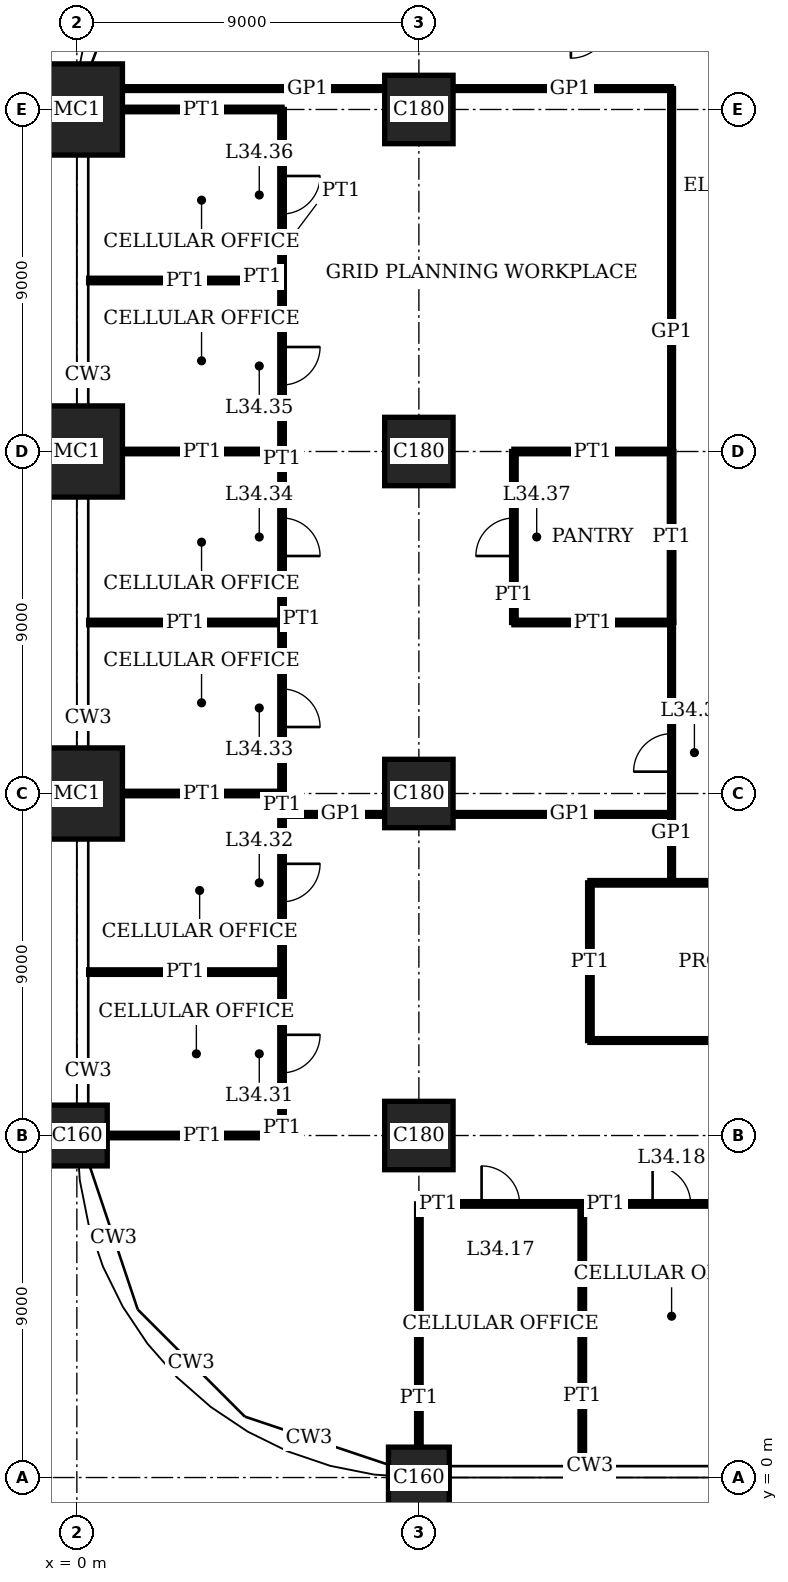
"""IFC4 building model, lengths in metres.
Left out: names, types, materials, properties, quantities, classifications, styles, units other than length and angle.
Written with IfcOpenShell. Run it as: python <this file> out.ifc"""

import sys

from ifc_helpers import new_model, si_unit, direction, frame, frame_2d, origin, origin_2d, place, context, subcontext, project, spatial, rectangle, extrude, element, fill, save


model = new_model("IFC4")
c1 = context("Model", 3, precision=1e-05, world=origin(), true_north=direction((0.0, 1.0)))
c2 = subcontext(c1, "Body", "Model", "MODEL_VIEW")
j1 = project(units=[si_unit("LENGTHUNIT", "METRE"), si_unit("PLANEANGLEUNIT", "RADIAN")], contexts=[c1])
p1 = place(None, origin())
s1 = spatial("IfcSite", under=j1, at=p1, CompositionType="ELEMENT")
p2 = place(p1, origin())
s2 = spatial("IfcBuilding", under=s1, at=p2, CompositionType="ELEMENT")
p3 = place(p2, frame((0.0, 0.0, 141.0)))
s3 = spatial("IfcBuildingStorey", under=s2, at=p3, CompositionType="ELEMENT", Elevation=141.0)
p4 = place(p3, frame((0.0, 9.0, 0.0), z_axis=(0.0, 0.0, 1.0), x_axis=(1.0, 0.0, 0.0)))
e1 = element("IfcColumn", 1, at=p4, inside=s3, PredefinedType="COLUMN", context=c2, shape_type="SweptSolid", body=[
    extrude(rectangle(XDim=1.6, YDim=1.6, at=origin_2d()), origin(), (0.0, 0.0, 1.0), 4.0),
])
for number, where, z_axis, x_axis in (
    (2, (0.0, 18.0, 0.0), (0.0, 0.0, 1.0), (1.0, 0.0, 0.0)),
    (3, (0.0, 27.0, 0.0), (0.0, 0.0, 1.0), (1.0, 0.0, 0.0)),
    (4, (0.0, 36.0, 0.0), (0.0, 0.0, 1.0), (1.0, 0.0, 0.0)),
):
    element("IfcColumn", number, at=place(p3, frame(where, z_axis=z_axis, x_axis=x_axis)), inside=s3, PredefinedType="COLUMN", context=c2, shape_type="SweptSolid", body=[
        extrude(rectangle(XDim=2.4, YDim=2.4, at=origin_2d()), origin(), (0.0, 0.0, 1.0), 4.0),
    ])
p5 = place(p3, frame((9.0, 0.0, 0.0), z_axis=(0.0, 0.0, 1.0), x_axis=(1.0, 0.0, 0.0)))
e5 = element("IfcColumn", 5, at=p5, inside=s3, PredefinedType="COLUMN", context=c2, shape_type="SweptSolid", body=[
    extrude(rectangle(XDim=1.6, YDim=1.6, at=origin_2d()), origin(), (0.0, 0.0, 1.0), 4.0),
])
for number, where, z_axis, x_axis in (
    (6, (9.0, 9.0, 0.0), (0.0, 0.0, 1.0), (1.0, 0.0, 0.0)),
    (7, (9.0, 18.0, 0.0), (0.0, 0.0, 1.0), (1.0, 0.0, 0.0)),
    (8, (9.0, 27.0, 0.0), (0.0, 0.0, 1.0), (1.0, 0.0, 0.0)),
    (9, (9.0, 36.0, 0.0), (0.0, 0.0, 1.0), (1.0, 0.0, 0.0)),
):
    element("IfcColumn", number, at=place(p3, frame(where, z_axis=z_axis, x_axis=x_axis)), inside=s3, PredefinedType="COLUMN", context=c2, shape_type="SweptSolid", body=[
        extrude(rectangle(XDim=1.8, YDim=1.8, at=origin_2d()), origin(), (0.0, 0.0, 1.0), 4.0),
    ])
p6 = place(p3, frame((9.0, 7.2, 0.0), z_axis=(0.0, 0.0, 1.0), x_axis=(1.0, 0.0, 0.0)))
e10 = element("IfcWall", 10, at=p6, inside=s3, PredefinedType="PARTITIONING", context=c2, shape_type="SweptSolid", body=[
    extrude(rectangle(XDim=4.3, YDim=0.12, at=frame_2d((2.15, 0.0))), origin(), (0.0, 0.0, 1.0), 3.75),
])
p7 = place(p6, frame((1.65, 0.0, 0.0)))
e11 = element("IfcOpeningElement", 11, at=p7, cuts=e10, PredefinedType="OPENING", context=c2, shape_type="SweptSolid", body=[
    extrude(rectangle(XDim=1.0, YDim=2.4, at=frame_2d((0.5, 1.2))), frame((0.0, 0.07, 0.0), z_axis=(0.0, -1.0, 0.0), x_axis=(1.0, 0.0, 0.0)), (0.0, 0.0, 1.0), 0.14),
])
p8 = place(p3, frame((13.3, 7.2, 0.0), z_axis=(0.0, 0.0, 1.0), x_axis=(1.0, 0.0, 0.0)))
e12 = element("IfcWall", 12, at=p8, inside=s3, PredefinedType="PARTITIONING", context=c2, shape_type="SweptSolid", body=[
    extrude(rectangle(XDim=4.7, YDim=0.12, at=frame_2d((2.35, 0.0))), origin(), (0.0, 0.0, 1.0), 3.75),
])
p9 = place(p8, frame((1.85, 0.0, 0.0)))
e13 = element("IfcOpeningElement", 13, at=p9, cuts=e12, PredefinedType="OPENING", context=c2, shape_type="SweptSolid", body=[
    extrude(rectangle(XDim=1.0, YDim=2.4, at=frame_2d((0.5, 1.2))), frame((0.0, 0.07, 0.0), z_axis=(0.0, -1.0, 0.0), x_axis=(1.0, 0.0, 0.0)), (0.0, 0.0, 1.0), 0.14),
])
p10 = place(p3, frame((0.8, 9.0, 0.0), z_axis=(0.0, 0.0, 1.0), x_axis=(1.0, 0.0, 0.0)))
e14 = element("IfcWall", 14, at=p10, inside=s3, PredefinedType="PARTITIONING", context=c2, shape_type="SweptSolid", body=[
    extrude(rectangle(XDim=4.6, YDim=0.12, at=frame_2d((2.3, 0.0))), origin(), (0.0, 0.0, 1.0), 3.05),
])
p11 = place(p3, frame((13.5, 11.5, 0.0), z_axis=(0.0, 0.0, 1.0), x_axis=(1.0, 0.0, 0.0)))
e15 = element("IfcWall", 15, at=p11, inside=s3, PredefinedType="PARTITIONING", context=c2, shape_type="SweptSolid", body=[
    extrude(rectangle(XDim=9.0, YDim=0.1, at=frame_2d((4.5, 0.0))), origin(), (0.0, 0.0, 1.0), 3.75),
])
p12 = place(p11, frame((4.0, 0.0, 0.0)))
e16 = element("IfcOpeningElement", 16, at=p12, cuts=e15, PredefinedType="OPENING", context=c2, shape_type="SweptSolid", body=[
    extrude(rectangle(XDim=1.0, YDim=2.4, at=frame_2d((0.5, 1.2))), frame((0.0, 0.06, 0.0), z_axis=(0.0, -1.0, 0.0), x_axis=(1.0, 0.0, 0.0)), (0.0, 0.0, 1.0), 0.12),
])
p13 = place(p3, frame((0.31, 13.3, 0.0), z_axis=(0.0, 0.0, 1.0), x_axis=(1.0, 0.0, 0.0)))
e17 = element("IfcWall", 17, at=p13, inside=s3, PredefinedType="PARTITIONING", context=c2, shape_type="SweptSolid", body=[
    extrude(rectangle(XDim=5.09, YDim=0.12, at=frame_2d((2.545, 0.0))), origin(), (0.0, 0.0, 1.0), 3.1),
])
p14 = place(p3, frame((13.5, 15.65, 0.0), z_axis=(0.0, 0.0, 1.0), x_axis=(1.0, 0.0, 0.0)))
e18 = element("IfcWall", 18, at=p14, inside=s3, PredefinedType="PARTITIONING", context=c2, shape_type="SweptSolid", body=[
    extrude(rectangle(XDim=9.0, YDim=0.12, at=frame_2d((4.5, 0.0))), origin(), (0.0, 0.0, 1.0), 3.75),
])
p15 = place(p3, frame((5.39, 17.45, 0.0), z_axis=(0.0, 0.0, 1.0), x_axis=(1.0, 0.0, 0.0)))
e19 = element("IfcWall", 19, at=p15, inside=s3, PredefinedType="PARTITIONING", context=c2, shape_type="SweptSolid", body=[
    extrude(rectangle(XDim=2.71, YDim=0.1, at=frame_2d((1.355, 0.0))), origin(), (0.0, 0.0, 1.0), 3.05),
])
p16 = place(p3, frame((9.9, 17.45, 0.0), z_axis=(0.0, 0.0, 1.0), x_axis=(1.0, 0.0, 0.0)))
e20 = element("IfcWall", 20, at=p16, inside=s3, PredefinedType="PARTITIONING", context=c2, shape_type="SweptSolid", body=[
    extrude(rectangle(XDim=5.75, YDim=0.1, at=frame_2d((2.875, 0.0))), origin(), (0.0, 0.0, 1.0), 3.05),
])
p17 = place(p3, frame((1.2, 18.0, 0.0), z_axis=(0.0, 0.0, 1.0), x_axis=(1.0, 0.0, 0.0)))
e21 = element("IfcWall", 21, at=p17, inside=s3, PredefinedType="PARTITIONING", context=c2, shape_type="SweptSolid", body=[
    extrude(rectangle(XDim=4.2, YDim=0.12, at=frame_2d((2.1, 0.0))), origin(), (0.0, 0.0, 1.0), 3.05),
])
p18 = place(p3, frame((0.31, 22.5, 0.0), z_axis=(0.0, 0.0, 1.0), x_axis=(1.0, 0.0, 0.0)))
e22 = element("IfcWall", 22, at=p18, inside=s3, PredefinedType="PARTITIONING", context=c2, shape_type="SweptSolid", body=[
    extrude(rectangle(XDim=5.09, YDim=0.12, at=frame_2d((2.545, 0.0))), origin(), (0.0, 0.0, 1.0), 3.1),
])
p19 = place(p3, frame((11.5, 22.5, 0.0), z_axis=(0.0, 0.0, 1.0), x_axis=(1.0, 0.0, 0.0)))
e23 = element("IfcWall", 23, at=p19, inside=s3, PredefinedType="PARTITIONING", context=c2, shape_type="SweptSolid", body=[
    extrude(rectangle(XDim=4.15, YDim=0.12, at=frame_2d((2.075, 0.0))), origin(), (0.0, 0.0, 1.0), 3.1),
])
p20 = place(p3, frame((1.2, 27.0, 0.0), z_axis=(0.0, 0.0, 1.0), x_axis=(1.0, 0.0, 0.0)))
e24 = element("IfcWall", 24, at=p20, inside=s3, PredefinedType="PARTITIONING", context=c2, shape_type="SweptSolid", body=[
    extrude(rectangle(XDim=4.2, YDim=0.12, at=frame_2d((2.1, 0.0))), origin(), (0.0, 0.0, 1.0), 3.05),
])
p21 = place(p3, frame((11.5, 27.0, 0.0), z_axis=(0.0, 0.0, 1.0), x_axis=(1.0, 0.0, 0.0)))
e25 = element("IfcWall", 25, at=p21, inside=s3, PredefinedType="PARTITIONING", context=c2, shape_type="SweptSolid", body=[
    extrude(rectangle(XDim=4.15, YDim=0.12, at=frame_2d((2.075, 0.0))), origin(), (0.0, 0.0, 1.0), 3.05),
])
p22 = place(p3, frame((0.31, 31.5, 0.0), z_axis=(0.0, 0.0, 1.0), x_axis=(1.0, 0.0, 0.0)))
e26 = element("IfcWall", 26, at=p22, inside=s3, PredefinedType="PARTITIONING", context=c2, shape_type="SweptSolid", body=[
    extrude(rectangle(XDim=5.09, YDim=0.12, at=frame_2d((2.545, 0.0))), origin(), (0.0, 0.0, 1.0), 3.1),
])
p23 = place(p3, frame((1.2, 36.0, 0.0), z_axis=(0.0, 0.0, 1.0), x_axis=(1.0, 0.0, 0.0)))
e27 = element("IfcWall", 27, at=p23, inside=s3, PredefinedType="PARTITIONING", context=c2, shape_type="SweptSolid", body=[
    extrude(rectangle(XDim=4.2, YDim=0.12, at=frame_2d((2.1, 0.0))), origin(), (0.0, 0.0, 1.0), 3.05),
])
p24 = place(p3, frame((1.2, 36.55, 0.0), z_axis=(0.0, 0.0, 1.0), x_axis=(1.0, 0.0, 0.0)))
e28 = element("IfcWall", 28, at=p24, inside=s3, PredefinedType="PARTITIONING", context=c2, shape_type="SweptSolid", body=[
    extrude(rectangle(XDim=6.9, YDim=0.1, at=frame_2d((3.45, 0.0))), origin(), (0.0, 0.0, 1.0), 3.05),
])
p25 = place(p3, frame((9.9, 36.55, 0.0), z_axis=(0.0, 0.0, 1.0), x_axis=(1.0, 0.0, 0.0)))
e29 = element("IfcWall", 29, at=p25, inside=s3, PredefinedType="PARTITIONING", context=c2, shape_type="SweptSolid", body=[
    extrude(rectangle(XDim=5.75, YDim=0.1, at=frame_2d((2.875, 0.0))), origin(), (0.0, 0.0, 1.0), 3.05),
])
p26 = place(p3, frame((5.4, 9.0, 0.0), z_axis=(0.0, 0.0, 1.0), x_axis=(0.0, 1.0, 0.0)))
e30 = element("IfcWall", 30, at=p26, inside=s3, PredefinedType="PARTITIONING", context=c2, shape_type="SweptSolid", body=[
    extrude(rectangle(XDim=4.3, YDim=0.12, at=frame_2d((2.15, 0.0))), origin(), (0.0, 0.0, 1.0), 3.75),
])
p27 = place(p26, frame((1.65, 0.0, 0.0)))
e31 = element("IfcOpeningElement", 31, at=p27, cuts=e30, PredefinedType="OPENING", context=c2, shape_type="SweptSolid", body=[
    extrude(rectangle(XDim=1.0, YDim=2.4, at=frame_2d((0.5, 1.2))), frame((0.0, 0.07, 0.0), z_axis=(0.0, -1.0, 0.0), x_axis=(1.0, 0.0, 0.0)), (0.0, 0.0, 1.0), 0.14),
])
p28 = place(p3, frame((5.4, 13.3, 0.0), z_axis=(0.0, 0.0, 1.0), x_axis=(0.0, 1.0, 0.0)))
e32 = element("IfcWall", 32, at=p28, inside=s3, PredefinedType="PARTITIONING", context=c2, shape_type="SweptSolid", body=[
    extrude(rectangle(XDim=4.7, YDim=0.12, at=frame_2d((2.35, 0.0))), origin(), (0.0, 0.0, 1.0), 3.75),
])
p29 = place(p28, frame((1.85, 0.0, 0.0)))
e33 = element("IfcOpeningElement", 33, at=p29, cuts=e32, PredefinedType="OPENING", context=c2, shape_type="SweptSolid", body=[
    extrude(rectangle(XDim=1.0, YDim=2.4, at=frame_2d((0.5, 1.2))), frame((0.0, 0.07, 0.0), z_axis=(0.0, -1.0, 0.0), x_axis=(1.0, 0.0, 0.0)), (0.0, 0.0, 1.0), 0.14),
])
p30 = place(p3, frame((5.4, 18.0, 0.0), z_axis=(0.0, 0.0, 1.0), x_axis=(0.0, 1.0, 0.0)))
e34 = element("IfcWall", 34, at=p30, inside=s3, PredefinedType="PARTITIONING", context=c2, shape_type="SweptSolid", body=[
    extrude(rectangle(XDim=4.5, YDim=0.12, at=frame_2d((2.25, 0.0))), origin(), (0.0, 0.0, 1.0), 3.75),
])
p31 = place(p30, frame((1.75, 0.0, 0.0)))
e35 = element("IfcOpeningElement", 35, at=p31, cuts=e34, PredefinedType="OPENING", context=c2, shape_type="SweptSolid", body=[
    extrude(rectangle(XDim=1.0, YDim=2.4, at=frame_2d((0.5, 1.2))), frame((0.0, 0.07, 0.0), z_axis=(0.0, -1.0, 0.0), x_axis=(1.0, 0.0, 0.0)), (0.0, 0.0, 1.0), 0.14),
])
p32 = place(p3, frame((5.4, 22.5, 0.0), z_axis=(0.0, 0.0, 1.0), x_axis=(0.0, 1.0, 0.0)))
e36 = element("IfcWall", 36, at=p32, inside=s3, PredefinedType="PARTITIONING", context=c2, shape_type="SweptSolid", body=[
    extrude(rectangle(XDim=4.5, YDim=0.12, at=frame_2d((2.25, 0.0))), origin(), (0.0, 0.0, 1.0), 3.75),
])
p33 = place(p32, frame((1.75, 0.0, 0.0)))
e37 = element("IfcOpeningElement", 37, at=p33, cuts=e36, PredefinedType="OPENING", context=c2, shape_type="SweptSolid", body=[
    extrude(rectangle(XDim=1.0, YDim=2.4, at=frame_2d((0.5, 1.2))), frame((0.0, 0.07, 0.0), z_axis=(0.0, -1.0, 0.0), x_axis=(1.0, 0.0, 0.0)), (0.0, 0.0, 1.0), 0.14),
])
p34 = place(p3, frame((5.4, 27.0, 0.0), z_axis=(0.0, 0.0, 1.0), x_axis=(0.0, 1.0, 0.0)))
e38 = element("IfcWall", 38, at=p34, inside=s3, PredefinedType="PARTITIONING", context=c2, shape_type="SweptSolid", body=[
    extrude(rectangle(XDim=4.5, YDim=0.12, at=frame_2d((2.25, 0.0))), origin(), (0.0, 0.0, 1.0), 3.75),
])
p35 = place(p34, frame((1.75, 0.0, 0.0)))
e39 = element("IfcOpeningElement", 39, at=p35, cuts=e38, PredefinedType="OPENING", context=c2, shape_type="SweptSolid", body=[
    extrude(rectangle(XDim=1.0, YDim=2.4, at=frame_2d((0.5, 1.2))), frame((0.0, 0.07, 0.0), z_axis=(0.0, -1.0, 0.0), x_axis=(1.0, 0.0, 0.0)), (0.0, 0.0, 1.0), 0.14),
])
p36 = place(p3, frame((5.4, 31.5, 0.0), z_axis=(0.0, 0.0, 1.0), x_axis=(0.0, 1.0, 0.0)))
e40 = element("IfcWall", 40, at=p36, inside=s3, PredefinedType="PARTITIONING", context=c2, shape_type="SweptSolid", body=[
    extrude(rectangle(XDim=4.5, YDim=0.12, at=frame_2d((2.25, 0.0))), origin(), (0.0, 0.0, 1.0), 3.75),
])
p37 = place(p36, frame((1.75, 0.0, 0.0)))
e41 = element("IfcOpeningElement", 41, at=p37, cuts=e40, PredefinedType="OPENING", context=c2, shape_type="SweptSolid", body=[
    extrude(rectangle(XDim=1.0, YDim=2.4, at=frame_2d((0.5, 1.2))), frame((0.0, 0.07, 0.0), z_axis=(0.0, -1.0, 0.0), x_axis=(1.0, 0.0, 0.0)), (0.0, 0.0, 1.0), 0.14),
])
p38 = place(p3, frame((9.0, 0.8, 0.0), z_axis=(0.0, 0.0, 1.0), x_axis=(0.0, 1.0, 0.0)))
e42 = element("IfcWall", 42, at=p38, inside=s3, PredefinedType="PARTITIONING", context=c2, shape_type="SweptSolid", body=[
    extrude(rectangle(XDim=6.4, YDim=0.12, at=frame_2d((3.2, 0.0))), origin(), (0.0, 0.0, 1.0), 3.05),
])
p39 = place(p3, frame((11.5, 22.5, 0.0), z_axis=(0.0, 0.0, 1.0), x_axis=(0.0, 1.0, 0.0)))
e43 = element("IfcWall", 43, at=p39, inside=s3, PredefinedType="PARTITIONING", context=c2, shape_type="SweptSolid", body=[
    extrude(rectangle(XDim=4.5, YDim=0.12, at=frame_2d((2.25, 0.0))), origin(), (0.0, 0.0, 1.0), 3.75),
])
p40 = place(p39, frame((1.75, 0.0, 0.0)))
e44 = element("IfcOpeningElement", 44, at=p40, cuts=e43, PredefinedType="OPENING", context=c2, shape_type="SweptSolid", body=[
    extrude(rectangle(XDim=1.0, YDim=2.4, at=frame_2d((0.5, 1.2))), frame((0.0, 0.07, 0.0), z_axis=(0.0, -1.0, 0.0), x_axis=(1.0, 0.0, 0.0)), (0.0, 0.0, 1.0), 0.14),
])
p41 = place(p3, frame((13.3, 0.31, 0.0), z_axis=(0.0, 0.0, 1.0), x_axis=(0.0, 1.0, 0.0)))
e45 = element("IfcWall", 45, at=p41, inside=s3, PredefinedType="PARTITIONING", context=c2, shape_type="SweptSolid", body=[
    extrude(rectangle(XDim=6.89, YDim=0.12, at=frame_2d((3.445, 0.0))), origin(), (0.0, 0.0, 1.0), 3.75),
])
p42 = place(p3, frame((13.5, 11.5, 0.0), z_axis=(0.0, 0.0, 1.0), x_axis=(0.0, 1.0, 0.0)))
e46 = element("IfcWall", 46, at=p42, inside=s3, PredefinedType="PARTITIONING", context=c2, shape_type="SweptSolid", body=[
    extrude(rectangle(XDim=4.15, YDim=0.12, at=frame_2d((2.075, 0.0))), origin(), (0.0, 0.0, 1.0), 3.75),
])
p43 = place(p3, frame((15.65, 22.5, 0.0), z_axis=(0.0, 0.0, 1.0), x_axis=(0.0, 1.0, 0.0)))
e47 = element("IfcWall", 47, at=p43, inside=s3, PredefinedType="PARTITIONING", context=c2, shape_type="SweptSolid", body=[
    extrude(rectangle(XDim=4.5, YDim=0.12, at=frame_2d((2.25, 0.0))), origin(), (0.0, 0.0, 1.0), 3.75),
])
p44 = place(p3, frame((15.65, 15.65, 0.0), z_axis=(0.0, 0.0, 1.0), x_axis=(0.0, 1.0, 0.0)))
e48 = element("IfcWall", 48, at=p44, inside=s3, PredefinedType="PARTITIONING", context=c2, shape_type="SweptSolid", body=[
    extrude(rectangle(XDim=6.85, YDim=0.1, at=frame_2d((3.425, 0.0))), origin(), (0.0, 0.0, 1.0), 3.75),
])
p45 = place(p44, frame((2.925, 0.0, 0.0)))
e49 = element("IfcOpeningElement", 49, at=p45, cuts=e48, PredefinedType="OPENING", context=c2, shape_type="SweptSolid", body=[
    extrude(rectangle(XDim=1.0, YDim=2.4, at=frame_2d((0.5, 1.2))), frame((0.0, 0.06, 0.0), z_axis=(0.0, -1.0, 0.0), x_axis=(1.0, 0.0, 0.0)), (0.0, 0.0, 1.0), 0.12),
])
p46 = place(p3, frame((15.65, 27.0, 0.0), z_axis=(0.0, 0.0, 1.0), x_axis=(0.0, 1.0, 0.0)))
e50 = element("IfcWall", 50, at=p46, inside=s3, PredefinedType="PARTITIONING", context=c2, shape_type="SweptSolid", body=[
    extrude(rectangle(XDim=9.55, YDim=0.1, at=frame_2d((4.775, 0.0))), origin(), (0.0, 0.0, 1.0), 3.75),
])
p47 = place(p7, origin())
e51 = element("IfcDoor", 51, at=p47, inside=s3, OperationType="SINGLE_SWING_RIGHT", PredefinedType="DOOR", context=c2, shape_type="SweptSolid", body=[
    extrude(rectangle(XDim=1.0, YDim=2.4, at=frame_2d((0.5, 1.2))), frame((0.0, 0.025, 0.0), z_axis=(0.0, -1.0, 0.0), x_axis=(1.0, 0.0, 0.0)), (0.0, 0.0, 1.0), 0.05),
])
fill(e11, e51)
p48 = place(p9, origin())
e52 = element("IfcDoor", 52, at=p48, inside=s3, OperationType="SINGLE_SWING_RIGHT", PredefinedType="DOOR", context=c2, shape_type="SweptSolid", body=[
    extrude(rectangle(XDim=1.0, YDim=2.4, at=frame_2d((0.5, 1.2))), frame((0.0, 0.025, 0.0), z_axis=(0.0, -1.0, 0.0), x_axis=(1.0, 0.0, 0.0)), (0.0, 0.0, 1.0), 0.05),
])
fill(e13, e52)
p49 = place(p27, origin())
e53 = element("IfcDoor", 53, at=p49, inside=s3, OperationType="SINGLE_SWING_RIGHT", PredefinedType="DOOR", context=c2, shape_type="SweptSolid", body=[
    extrude(rectangle(XDim=1.0, YDim=2.4, at=frame_2d((0.5, 1.2))), frame((0.0, 0.025, 0.0), z_axis=(0.0, -1.0, 0.0), x_axis=(1.0, 0.0, 0.0)), (0.0, 0.0, 1.0), 0.05),
])
fill(e31, e53)
p50 = place(p29, origin())
e54 = element("IfcDoor", 54, at=p50, inside=s3, OperationType="SINGLE_SWING_RIGHT", PredefinedType="DOOR", context=c2, shape_type="SweptSolid", body=[
    extrude(rectangle(XDim=1.0, YDim=2.4, at=frame_2d((0.5, 1.2))), frame((0.0, 0.025, 0.0), z_axis=(0.0, -1.0, 0.0), x_axis=(1.0, 0.0, 0.0)), (0.0, 0.0, 1.0), 0.05),
])
fill(e33, e54)
p51 = place(p31, origin())
e55 = element("IfcDoor", 55, at=p51, inside=s3, OperationType="SINGLE_SWING_LEFT", PredefinedType="DOOR", context=c2, shape_type="SweptSolid", body=[
    extrude(rectangle(XDim=1.0, YDim=2.4, at=frame_2d((0.5, 1.2))), frame((0.0, 0.025, 0.0), z_axis=(0.0, -1.0, 0.0), x_axis=(1.0, 0.0, 0.0)), (0.0, 0.0, 1.0), 0.05),
])
fill(e35, e55)
p52 = place(p33, origin())
e56 = element("IfcDoor", 56, at=p52, inside=s3, OperationType="SINGLE_SWING_LEFT", PredefinedType="DOOR", context=c2, shape_type="SweptSolid", body=[
    extrude(rectangle(XDim=1.0, YDim=2.4, at=frame_2d((0.5, 1.2))), frame((0.0, 0.025, 0.0), z_axis=(0.0, -1.0, 0.0), x_axis=(1.0, 0.0, 0.0)), (0.0, 0.0, 1.0), 0.05),
])
fill(e37, e56)
p53 = place(p35, origin())
e57 = element("IfcDoor", 57, at=p53, inside=s3, OperationType="SINGLE_SWING_RIGHT", PredefinedType="DOOR", context=c2, shape_type="SweptSolid", body=[
    extrude(rectangle(XDim=1.0, YDim=2.4, at=frame_2d((0.5, 1.2))), frame((0.0, 0.025, 0.0), z_axis=(0.0, -1.0, 0.0), x_axis=(1.0, 0.0, 0.0)), (0.0, 0.0, 1.0), 0.05),
])
fill(e39, e57)
p54 = place(p37, origin())
e58 = element("IfcDoor", 58, at=p54, inside=s3, OperationType="SINGLE_SWING_RIGHT", PredefinedType="DOOR", context=c2, shape_type="SweptSolid", body=[
    extrude(rectangle(XDim=1.0, YDim=2.4, at=frame_2d((0.5, 1.2))), frame((0.0, 0.025, 0.0), z_axis=(0.0, -1.0, 0.0), x_axis=(1.0, 0.0, 0.0)), (0.0, 0.0, 1.0), 0.05),
])
fill(e41, e58)
p55 = place(p40, origin())
e59 = element("IfcDoor", 59, at=p55, inside=s3, OperationType="SINGLE_SWING_RIGHT", PredefinedType="DOOR", context=c2, shape_type="SweptSolid", body=[
    extrude(rectangle(XDim=1.0, YDim=2.4, at=frame_2d((0.5, 1.2))), frame((0.0, 0.025, 0.0), z_axis=(0.0, -1.0, 0.0), x_axis=(1.0, 0.0, 0.0)), (0.0, 0.0, 1.0), 0.05),
])
fill(e44, e59)
p56 = place(p45, origin())
e60 = element("IfcDoor", 60, at=p56, inside=s3, OperationType="SINGLE_SWING_RIGHT", PredefinedType="DOOR", context=c2, shape_type="SweptSolid", body=[
    extrude(rectangle(XDim=1.0, YDim=2.4, at=frame_2d((0.5, 1.2))), frame((0.0, 0.02, 0.0), z_axis=(0.0, -1.0, 0.0), x_axis=(1.0, 0.0, 0.0)), (0.0, 0.0, 1.0), 0.04),
])
fill(e49, e60)
save(model, sys.argv[1])
